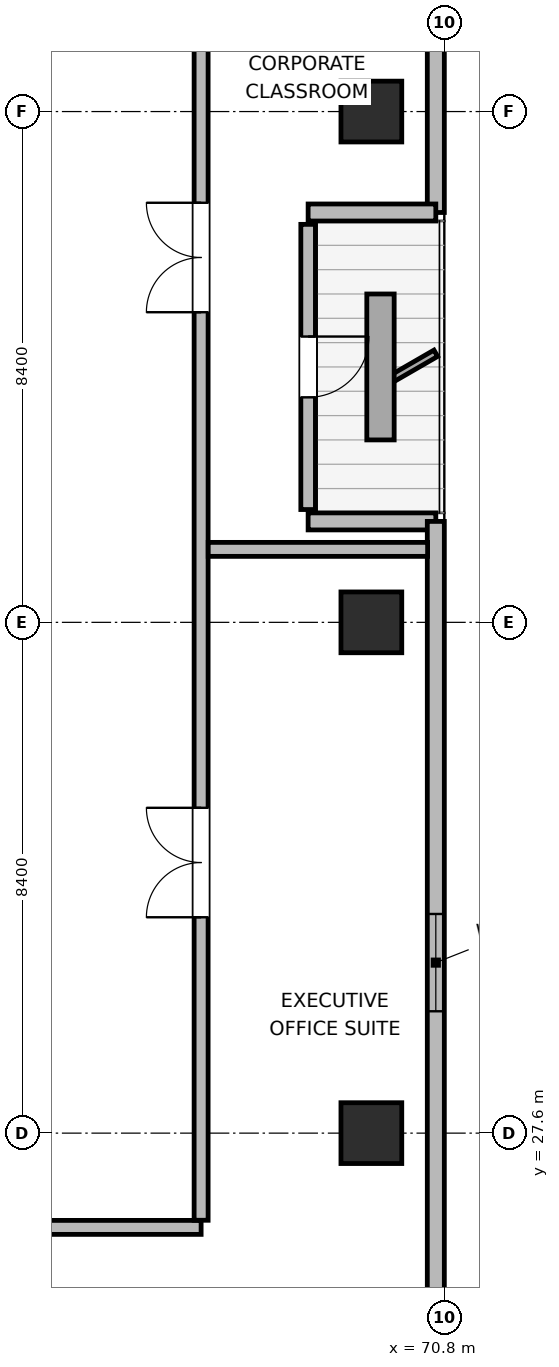
"""IFC4 building model, lengths in metres.
Left out: names, types, materials, properties, quantities, classifications, styles, units other than length and angle.
Written with IfcOpenShell. Run it as: python <this file> out.ifc"""

import sys

from ifc_helpers import new_model, si_unit, direction, frame, frame_2d, origin, origin_2d, place, context, subcontext, project, spatial, rectangle, extrude, element, fill, save


model = new_model("IFC4")
c1 = context("Model", 3, precision=1e-05, world=origin(), true_north=direction((0.0, 1.0)))
c2 = subcontext(c1, "Body", "Model", "MODEL_VIEW")
j1 = project(units=[si_unit("LENGTHUNIT", "METRE"), si_unit("PLANEANGLEUNIT", "RADIAN")], contexts=[c1])
p1 = place(None, origin())
s1 = spatial("IfcSite", under=j1, at=p1, CompositionType="ELEMENT")
p2 = place(p1, origin())
s2 = spatial("IfcBuilding", under=s1, at=p2, CompositionType="ELEMENT")
p3 = place(p2, frame((0.0, 0.0, 255.0)))
s3 = spatial("IfcBuildingStorey", under=s2, at=p3, CompositionType="ELEMENT", Elevation=255.0)
for number, where, z_axis, x_axis in (
    (1, (69.6, 27.6, 0.0), (0.0, 0.0, 1.0), (1.0, 0.0, 0.0)),
    (2, (69.6, 36.0, 0.0), (0.0, 0.0, 1.0), (1.0, 0.0, 0.0)),
    (3, (69.6, 44.4, 0.0), (0.0, 0.0, 1.0), (1.0, 0.0, 0.0)),
):
    element("IfcColumn", number, at=place(p3, frame(where, z_axis=z_axis, x_axis=x_axis)), inside=s3, PredefinedType="COLUMN", context=c2, shape_type="SweptSolid", body=[
        extrude(rectangle(XDim=1.0, YDim=1.0, at=origin_2d()), origin(), (0.0, 0.0, 1.0), 3.9),
    ])
p4 = place(p3, frame((70.66, 48.582, 0.0), z_axis=(0.0, 0.0, 1.0), x_axis=(0.0, -1.0, 0.0)))
e4 = element("IfcWall", 4, at=p4, inside=s3, PredefinedType="SOLIDWALL", context=c2, shape_type="SweptSolid", body=[
    extrude(rectangle(XDim=5.842, YDim=0.28, at=frame_2d((2.921, 0.0))), origin(), (0.0, 0.0, 1.0), 3.68),
])
p5 = place(p3, frame((70.66, 42.74, 0.0), z_axis=(0.0, 0.0, 1.0), x_axis=(-1.0, 0.0, 0.0)))
e5 = element("IfcWall", 5, at=p5, inside=s3, PredefinedType="SOLIDWALL", context=c2, shape_type="SweptSolid", body=[
    extrude(rectangle(XDim=2.1, YDim=0.28, at=frame_2d((1.05, 0.0))), origin(), (0.0, 0.0, 1.0), 3.126),
])
p6 = place(p3, frame((68.56, 42.545, 0.0), z_axis=(0.0, 0.0, 1.0), x_axis=(0.0, -1.0, 0.0)))
e6 = element("IfcWall", 6, at=p6, inside=s3, PredefinedType="SOLIDWALL", context=c2, shape_type="SweptSolid", body=[
    extrude(rectangle(XDim=4.69, YDim=0.24, at=frame_2d((2.345, 0.0))), origin(), (0.0, 0.0, 1.0), 3.311),
])
p7 = place(p6, frame((1.845, 0.0, 0.0)))
e7 = element("IfcOpeningElement", 7, at=p7, cuts=e6, PredefinedType="OPENING", context=c2, shape_type="SweptSolid", body=[
    extrude(rectangle(XDim=1.0, YDim=2.02, at=frame_2d((0.5, 1.01))), frame((0.0, 0.13, 0.0), z_axis=(0.0, -1.0, 0.0), x_axis=(1.0, 0.0, 0.0)), (0.0, 0.0, 1.0), 0.26),
])
p8 = place(p3, frame((68.56, 37.66, 0.0), z_axis=(0.0, 0.0, 1.0), x_axis=(1.0, 0.0, 0.0)))
e8 = element("IfcWall", 8, at=p8, inside=s3, PredefinedType="SOLIDWALL", context=c2, shape_type="SweptSolid", body=[
    extrude(rectangle(XDim=2.1, YDim=0.28, at=frame_2d((1.05, 0.0))), origin(), (0.0, 0.0, 1.0), 3.126),
])
p9 = place(p3, frame((70.66, 37.66, 0.0), z_axis=(0.0, 0.0, 1.0), x_axis=(0.0, -1.0, 0.0)))
e9 = element("IfcWall", 9, at=p9, inside=s3, PredefinedType="SOLIDWALL", context=c2, shape_type="SweptSolid", body=[
    extrude(rectangle(XDim=14.241, YDim=0.28, at=frame_2d((7.121, 0.0))), origin(), (0.0, 0.0, 1.0), 3.68),
])
p10 = place(p9, frame((6.456, 0.0, 0.85)))
e10 = element("IfcOpeningElement", 10, at=p10, cuts=e9, PredefinedType="OPENING", context=c2, shape_type="SweptSolid", body=[
    extrude(rectangle(XDim=1.6, YDim=1.0, at=frame_2d((0.8, 0.5))), frame((0.0, 0.15, 0.0), z_axis=(0.0, -1.0, 0.0), x_axis=(1.0, 0.0, 0.0)), (0.0, 0.0, 1.0), 0.3),
])
p11 = place(p3, frame((30.8, 26.05, 0.0), z_axis=(0.0, 0.0, 1.0), x_axis=(1.0, 0.0, 0.0)))
e11 = element("IfcWall", 11, at=p11, inside=s3, PredefinedType="PARTITIONING", context=c2, shape_type="SweptSolid", body=[
    extrude(rectangle(XDim=36.0, YDim=0.23, at=frame_2d((18.0, 0.0))), origin(), (0.0, 0.0, 1.0), 3.68),
])
p12 = place(p11, frame((7.875, 0.0, 0.0)))
e12 = element("IfcOpeningElement", 12, at=p12, cuts=e11, PredefinedType="OPENING", context=c2, shape_type="SweptSolid", body=[
    extrude(rectangle(XDim=1.8, YDim=2.06, at=frame_2d((0.9, 1.03))), frame((0.0, 0.125, 0.0), z_axis=(0.0, -1.0, 0.0), x_axis=(1.0, 0.0, 0.0)), (0.0, 0.0, 1.0), 0.25),
])
p13 = place(p11, frame((25.875, 0.0, 0.0)))
e13 = element("IfcOpeningElement", 13, at=p13, cuts=e11, PredefinedType="OPENING", context=c2, shape_type="SweptSolid", body=[
    extrude(rectangle(XDim=1.8, YDim=2.06, at=frame_2d((0.9, 1.03))), frame((0.0, 0.125, 0.0), z_axis=(0.0, -1.0, 0.0), x_axis=(1.0, 0.0, 0.0)), (0.0, 0.0, 1.0), 0.25),
])
p14 = place(p3, frame((66.8, 26.167, 0.0), z_axis=(0.0, 0.0, 1.0), x_axis=(0.0, 1.0, 0.0)))
e14 = element("IfcWall", 14, at=p14, inside=s3, PredefinedType="PARTITIONING", context=c2, shape_type="SweptSolid", body=[
    extrude(rectangle(XDim=19.666, YDim=0.23, at=frame_2d((9.833, 0.0))), origin(), (0.0, 0.0, 1.0), 3.68),
])
p15 = place(p14, frame((4.983, 0.0, 0.0)))
e15 = element("IfcOpeningElement", 15, at=p15, cuts=e14, PredefinedType="OPENING", context=c2, shape_type="SweptSolid", body=[
    extrude(rectangle(XDim=1.8, YDim=2.06, at=frame_2d((0.9, 1.03))), frame((0.0, 0.125, 0.0), z_axis=(0.0, -1.0, 0.0), x_axis=(1.0, 0.0, 0.0)), (0.0, 0.0, 1.0), 0.25),
])
p16 = place(p14, frame((14.933, 0.0, 0.0)))
e16 = element("IfcOpeningElement", 16, at=p16, cuts=e14, PredefinedType="OPENING", context=c2, shape_type="SweptSolid", body=[
    extrude(rectangle(XDim=1.8, YDim=2.06, at=frame_2d((0.9, 1.03))), frame((0.0, 0.125, 0.0), z_axis=(0.0, -1.0, 0.0), x_axis=(1.0, 0.0, 0.0)), (0.0, 0.0, 1.0), 0.25),
])
p17 = place(p3, frame((66.917, 37.2, 0.0), z_axis=(0.0, 0.0, 1.0), x_axis=(1.0, 0.0, 0.0)))
e17 = element("IfcWall", 17, at=p17, inside=s3, PredefinedType="PARTITIONING", context=c2, shape_type="SweptSolid", body=[
    extrude(rectangle(XDim=3.608, YDim=0.23, at=frame_2d((1.804, 0.0))), origin(), (0.0, 0.0, 1.0), 3.68),
])
p18 = place(p7, origin())
e18 = element("IfcDoor", 18, at=p18, inside=s3, OperationType="SINGLE_SWING_LEFT", PredefinedType="DOOR", context=c2, shape_type="SweptSolid", body=[
    extrude(rectangle(XDim=1.0, YDim=2.02, at=frame_2d((0.5, 1.01))), frame((0.0, 0.025, 0.0), z_axis=(0.0, -1.0, 0.0), x_axis=(1.0, 0.0, 0.0)), (0.0, 0.0, 1.0), 0.05),
])
fill(e7, e18)
p19 = place(p10, origin())
e19 = element("IfcWindow", 19, at=p19, inside=s3, PartitioningType="SINGLE_PANEL", PredefinedType="WINDOW", context=c2, shape_type="SweptSolid", body=[
    extrude(rectangle(XDim=1.6, YDim=1.0, at=frame_2d((0.8, 0.5))), frame((0.0, 0.03, 0.0), z_axis=(0.0, -1.0, 0.0), x_axis=(1.0, 0.0, 0.0)), (0.0, 0.0, 1.0), 0.06),
])
fill(e10, e19)
p20 = place(p15, origin())
e20 = element("IfcDoor", 20, at=p20, inside=s3, OperationType="DOUBLE_DOOR_SINGLE_SWING", PredefinedType="DOOR", context=c2, shape_type="SweptSolid", body=[
    extrude(rectangle(XDim=1.8, YDim=2.06, at=frame_2d((0.9, 1.03))), frame((0.0, 0.025, 0.0), z_axis=(0.0, -1.0, 0.0), x_axis=(1.0, 0.0, 0.0)), (0.0, 0.0, 1.0), 0.05),
])
fill(e15, e20)
p21 = place(p16, origin())
e21 = element("IfcDoor", 21, at=p21, inside=s3, OperationType="DOUBLE_DOOR_SINGLE_SWING", PredefinedType="DOOR", context=c2, shape_type="SweptSolid", body=[
    extrude(rectangle(XDim=1.8, YDim=2.06, at=frame_2d((0.9, 1.03))), frame((0.0, 0.025, 0.0), z_axis=(0.0, -1.0, 0.0), x_axis=(1.0, 0.0, 0.0)), (0.0, 0.0, 1.0), 0.05),
])
fill(e16, e21)
save(model, sys.argv[1])
